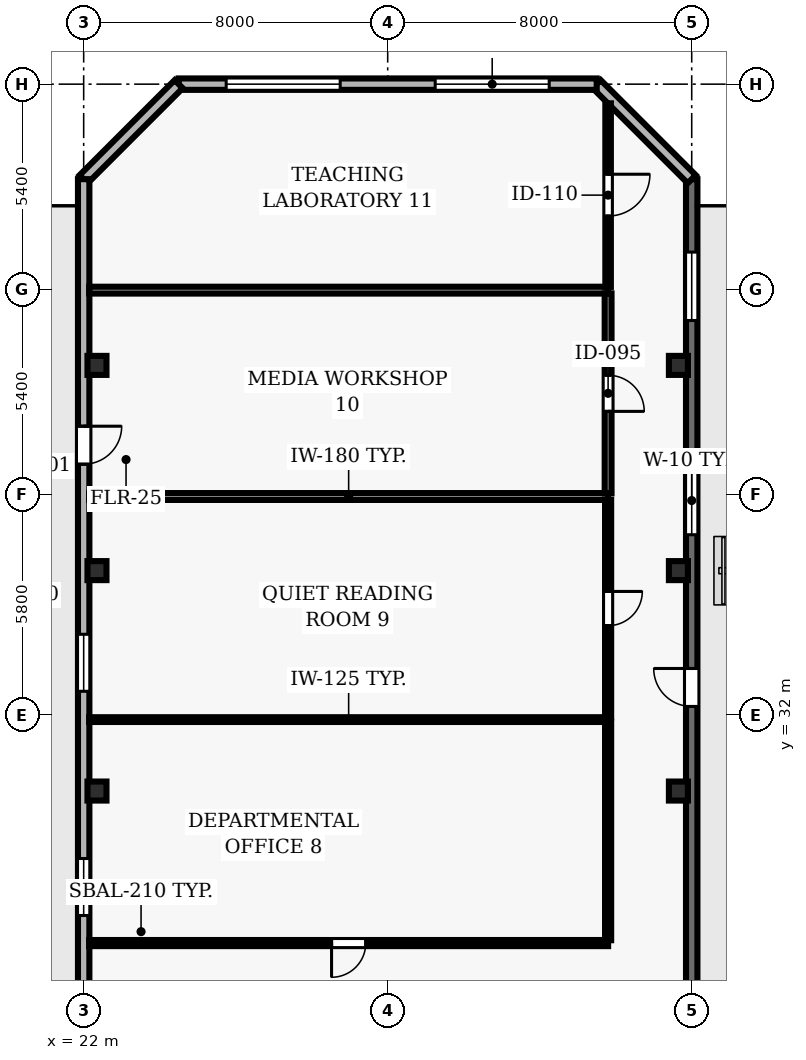
"""IFC4 building model, lengths in metres.
Left out: names, types, materials, properties, quantities, classifications, styles, units other than length and angle.
Written with IfcOpenShell. Run it as: python <this file> out.ifc"""

import sys

from ifc_helpers import new_model, si_unit, direction, frame, frame_2d, origin, origin_2d, place, context, subcontext, project, spatial, rectangle, hollow_rectangle, extrude, element, fill, save


model = new_model("IFC4")
c1 = context("Model", 3, precision=1e-05, world=origin(), true_north=direction((0.0, 1.0)))
c2 = subcontext(c1, "Body", "Model", "MODEL_VIEW")
j1 = project(units=[si_unit("LENGTHUNIT", "METRE"), si_unit("PLANEANGLEUNIT", "RADIAN")], contexts=[c1])
p1 = place(None, origin())
s1 = spatial("IfcSite", under=j1, at=p1, CompositionType="ELEMENT")
p2 = place(p1, origin())
s2 = spatial("IfcBuilding", under=s1, at=p2, CompositionType="ELEMENT")
p3 = place(p2, frame((0.0, 0.0, 154.1)))
s3 = spatial("IfcBuildingStorey", under=s2, at=p3, CompositionType="ELEMENT", Elevation=154.1)
for number, where, z_axis, x_axis in (
    (1, (22.35, 30.0, 0.0), (0.0, 0.0, 1.0), (1.0, 0.0, 0.0)),
    (2, (37.65, 30.0, 0.0), (0.0, 0.0, 1.0), (1.0, 0.0, 0.0)),
    (3, (22.35, 35.8, 0.0), (0.0, 0.0, 1.0), (1.0, 0.0, 0.0)),
    (4, (37.65, 35.8, 0.0), (0.0, 0.0, 1.0), (1.0, 0.0, 0.0)),
    (5, (22.35, 41.2, 0.0), (0.0, 0.0, 1.0), (1.0, 0.0, 0.0)),
    (6, (37.65, 41.2, 0.0), (0.0, 0.0, 1.0), (1.0, 0.0, 0.0)),
):
    element("IfcColumn", number, at=place(p3, frame(where, z_axis=z_axis, x_axis=x_axis)), inside=s3, PredefinedType="COLUMN", context=c2, shape_type="SweptSolid", body=[
        extrude(hollow_rectangle(XDim=0.5, YDim=0.5, WallThickness=0.025, at=origin_2d()), origin(), (0.0, 0.0, 1.0), 3.9),
    ])
p4 = place(p3, frame((38.0, 23.55, 0.0), z_axis=(0.0, 0.0, 1.0), x_axis=(0.0, 1.0, 0.0)))
e7 = element("IfcWall", 7, at=p4, inside=s3, PredefinedType="SOLIDWALL", context=c2, shape_type="SweptSolid", body=[
    extrude(rectangle(XDim=22.55, YDim=0.3, at=frame_2d((11.275, 0.0))), origin(), (0.0, 0.0, 1.0), 3.69),
])
p5 = place(p4, frame((8.675, 0.0, 0.0)))
e8 = element("IfcOpeningElement", 8, at=p5, cuts=e7, PredefinedType="OPENING", context=c2, shape_type="SweptSolid", body=[
    extrude(rectangle(XDim=1.0, YDim=2.2, at=frame_2d((0.5, 1.1))), frame((0.0, 0.16, 0.0), z_axis=(0.0, -1.0, 0.0), x_axis=(1.0, 0.0, 0.0)), (0.0, 0.0, 1.0), 0.32),
])
p6 = place(p4, frame((13.194, 0.0, 0.9)))
e9 = element("IfcOpeningElement", 9, at=p6, cuts=e7, PredefinedType="OPENING", context=c2, shape_type="SweptSolid", body=[
    extrude(rectangle(XDim=1.8, YDim=2.2, at=frame_2d((0.9, 1.1))), frame((0.0, 0.16, 0.0), z_axis=(0.0, -1.0, 0.0), x_axis=(1.0, 0.0, 0.0)), (0.0, 0.0, 1.0), 0.32),
])
p7 = place(p4, frame((18.831, 0.0, 0.9)))
e10 = element("IfcOpeningElement", 10, at=p7, cuts=e7, PredefinedType="OPENING", context=c2, shape_type="SweptSolid", body=[
    extrude(rectangle(XDim=1.8, YDim=2.2, at=frame_2d((0.9, 1.1))), frame((0.0, 0.16, 0.0), z_axis=(0.0, -1.0, 0.0), x_axis=(1.0, 0.0, 0.0)), (0.0, 0.0, 1.0), 0.32),
])
p8 = place(p3, frame((38.0, 46.1, 0.0), z_axis=(0.0, 0.0, 1.0), x_axis=(-0.707106781187, 0.707106781187, 0.0)))
e11 = element("IfcWall", 11, at=p8, inside=s3, PredefinedType="SOLIDWALL", context=c2, shape_type="SweptSolid", body=[
    extrude(rectangle(XDim=3.536, YDim=0.3, at=frame_2d((1.768, 0.0))), origin(), (0.0, 0.0, 1.0), 3.69),
])
p9 = place(p3, frame((35.5, 48.6, 0.0), z_axis=(0.0, 0.0, 1.0), x_axis=(-1.0, 0.0, 0.0)))
e12 = element("IfcWall", 12, at=p9, inside=s3, PredefinedType="SOLIDWALL", context=c2, shape_type="SweptSolid", body=[
    extrude(rectangle(XDim=11.0, YDim=0.3, at=frame_2d((5.5, 0.0))), origin(), (0.0, 0.0, 1.0), 3.69),
])
p10 = place(p9, frame((1.25, 0.0, 0.9)))
e13 = element("IfcOpeningElement", 13, at=p10, cuts=e12, PredefinedType="OPENING", context=c2, shape_type="SweptSolid", body=[
    extrude(rectangle(XDim=3.0, YDim=2.2, at=frame_2d((1.5, 1.1))), frame((0.0, 0.16, 0.0), z_axis=(0.0, -1.0, 0.0), x_axis=(1.0, 0.0, 0.0)), (0.0, 0.0, 1.0), 0.32),
])
p11 = place(p9, frame((6.75, 0.0, 0.9)))
e14 = element("IfcOpeningElement", 14, at=p11, cuts=e12, PredefinedType="OPENING", context=c2, shape_type="SweptSolid", body=[
    extrude(rectangle(XDim=3.0, YDim=2.2, at=frame_2d((1.5, 1.1))), frame((0.0, 0.16, 0.0), z_axis=(0.0, -1.0, 0.0), x_axis=(1.0, 0.0, 0.0)), (0.0, 0.0, 1.0), 0.32),
])
p12 = place(p3, frame((24.5, 48.6, 0.0), z_axis=(0.0, 0.0, 1.0), x_axis=(-0.707106781187, -0.707106781187, 0.0)))
e15 = element("IfcWall", 15, at=p12, inside=s3, PredefinedType="SOLIDWALL", context=c2, shape_type="SweptSolid", body=[
    extrude(rectangle(XDim=3.536, YDim=0.3, at=frame_2d((1.768, 0.0))), origin(), (0.0, 0.0, 1.0), 3.69),
])
p13 = place(p3, frame((22.0, 46.1, 0.0), z_axis=(0.0, 0.0, 1.0), x_axis=(0.0, -1.0, 0.0)))
e16 = element("IfcWall", 16, at=p13, inside=s3, PredefinedType="SOLIDWALL", context=c2, shape_type="SweptSolid", body=[
    extrude(rectangle(XDim=43.6, YDim=0.3, at=frame_2d((21.8, 0.0))), origin(), (0.0, 0.0, 1.0), 3.69),
])
p14 = place(p13, frame((6.5, 0.0, 0.0)))
e17 = element("IfcOpeningElement", 17, at=p14, cuts=e16, PredefinedType="OPENING", context=c2, shape_type="SweptSolid", body=[
    extrude(rectangle(XDim=1.0, YDim=2.2, at=frame_2d((0.5, 1.1))), frame((0.0, 0.16, 0.0), z_axis=(0.0, -1.0, 0.0), x_axis=(1.0, 0.0, 0.0)), (0.0, 0.0, 1.0), 0.32),
])
p15 = place(p13, frame((11.975, 0.0, 0.9)))
e18 = element("IfcOpeningElement", 18, at=p15, cuts=e16, PredefinedType="OPENING", context=c2, shape_type="SweptSolid", body=[
    extrude(rectangle(XDim=1.5, YDim=1.6, at=frame_2d((0.75, 0.8))), frame((0.0, 0.16, 0.0), z_axis=(0.0, -1.0, 0.0), x_axis=(1.0, 0.0, 0.0)), (0.0, 0.0, 1.0), 0.32),
])
p16 = place(p13, frame((17.875, 0.0, 0.9)))
e19 = element("IfcOpeningElement", 19, at=p16, cuts=e16, PredefinedType="OPENING", context=c2, shape_type="SweptSolid", body=[
    extrude(rectangle(XDim=1.5, YDim=1.6, at=frame_2d((0.75, 0.8))), frame((0.0, 0.16, 0.0), z_axis=(0.0, -1.0, 0.0), x_axis=(1.0, 0.0, 0.0)), (0.0, 0.0, 1.0), 0.32),
])
p17 = place(p13, frame((23.775, 0.0, 0.9)))
e20 = element("IfcOpeningElement", 20, at=p17, cuts=e16, PredefinedType="OPENING", context=c2, shape_type="SweptSolid", body=[
    extrude(rectangle(XDim=1.5, YDim=1.6, at=frame_2d((0.75, 0.8))), frame((0.0, 0.16, 0.0), z_axis=(0.0, -1.0, 0.0), x_axis=(1.0, 0.0, 0.0)), (0.0, 0.0, 1.0), 0.32),
])
p18 = place(p13, frame((28.775, 0.0, 0.9)))
e21 = element("IfcOpeningElement", 21, at=p18, cuts=e16, PredefinedType="OPENING", context=c2, shape_type="SweptSolid", body=[
    extrude(rectangle(XDim=1.5, YDim=1.6, at=frame_2d((0.75, 0.8))), frame((0.0, 0.16, 0.0), z_axis=(0.0, -1.0, 0.0), x_axis=(1.0, 0.0, 0.0)), (0.0, 0.0, 1.0), 0.32),
])
p19 = place(p13, frame((34.675, 0.0, 0.9)))
e22 = element("IfcOpeningElement", 22, at=p19, cuts=e16, PredefinedType="OPENING", context=c2, shape_type="SweptSolid", body=[
    extrude(rectangle(XDim=1.5, YDim=1.6, at=frame_2d((0.75, 0.8))), frame((0.0, 0.16, 0.0), z_axis=(0.0, -1.0, 0.0), x_axis=(1.0, 0.0, 0.0)), (0.0, 0.0, 1.0), 0.32),
])
p20 = place(p3, frame((35.8, 26.0, 0.0), z_axis=(0.0, 0.0, 1.0), x_axis=(-1.0, 0.0, 0.0)))
e23 = element("IfcWall", 23, at=p20, inside=s3, PredefinedType="PARTITIONING", context=c2, shape_type="SweptSolid", body=[
    extrude(rectangle(XDim=13.655, YDim=0.16, at=frame_2d((6.828, 0.0))), origin(), (0.0, 0.0, 1.0), 3.69),
])
p21 = place(p20, frame((6.377, 0.0, 0.0)))
e24 = element("IfcOpeningElement", 24, at=p21, cuts=e23, PredefinedType="OPENING", context=c2, shape_type="SweptSolid", body=[
    extrude(rectangle(XDim=0.9, YDim=2.1, at=frame_2d((0.45, 1.05))), frame((0.0, 0.09, 0.0), z_axis=(0.0, -1.0, 0.0), x_axis=(1.0, 0.0, 0.0)), (0.0, 0.0, 1.0), 0.18),
])
p22 = place(p3, frame((35.8, 31.88, 0.0), z_axis=(0.0, 0.0, 1.0), x_axis=(-1.0, 0.0, 0.0)))
e25 = element("IfcWall", 25, at=p22, inside=s3, PredefinedType="PARTITIONING", context=c2, shape_type="SweptSolid", body=[
    extrude(rectangle(XDim=13.655, YDim=0.125, at=frame_2d((6.828, 0.0))), origin(), (0.0, 0.0, 1.0), 3.69),
])
for number, where, z_axis, x_axis in (
    (26, (35.8, 37.75, 0.0), (0.0, 0.0, 1.0), (-1.0, 0.0, 0.0)),
    (27, (35.8, 43.18, 0.0), (0.0, 0.0, 1.0), (-1.0, 0.0, 0.0)),
):
    element("IfcWall", number, at=place(p3, frame(where, z_axis=z_axis, x_axis=x_axis)), inside=s3, PredefinedType="PARTITIONING", context=c2, shape_type="SweptSolid", body=[
        extrude(rectangle(XDim=13.655, YDim=0.18, at=frame_2d((6.828, 0.0))), origin(), (0.0, 0.0, 1.0), 3.69),
    ])
p23 = place(p3, frame((35.8, 31.822, 0.0), z_axis=(0.0, 0.0, 1.0), x_axis=(0.0, -1.0, 0.0)))
e28 = element("IfcWall", 28, at=p23, inside=s3, PredefinedType="PARTITIONING", context=c2, shape_type="SweptSolid", body=[
    extrude(rectangle(XDim=5.747, YDim=0.16, at=frame_2d((2.874, 0.0))), origin(), (0.0, 0.0, 1.0), 3.69),
])
p24 = place(p3, frame((35.8, 37.665, 0.0), z_axis=(0.0, 0.0, 1.0), x_axis=(0.0, -1.0, 0.0)))
e29 = element("IfcWall", 29, at=p24, inside=s3, PredefinedType="PARTITIONING", context=c2, shape_type="SweptSolid", body=[
    extrude(rectangle(XDim=5.727, YDim=0.16, at=frame_2d((2.864, 0.0))), origin(), (0.0, 0.0, 1.0), 3.69),
])
p25 = place(p24, frame((2.413, 0.0, 0.0)))
e30 = element("IfcOpeningElement", 30, at=p25, cuts=e29, PredefinedType="OPENING", context=c2, shape_type="SweptSolid", body=[
    extrude(rectangle(XDim=0.9, YDim=2.1, at=frame_2d((0.45, 1.05))), frame((0.0, 0.09, 0.0), z_axis=(0.0, -1.0, 0.0), x_axis=(1.0, 0.0, 0.0)), (0.0, 0.0, 1.0), 0.18),
])
p26 = place(p3, frame((35.8, 43.095, 0.0), z_axis=(0.0, 0.0, 1.0), x_axis=(0.0, -1.0, 0.0)))
e31 = element("IfcWall", 31, at=p26, inside=s3, PredefinedType="PARTITIONING", context=c2, shape_type="SweptSolid", body=[
    extrude(rectangle(XDim=5.26, YDim=0.18, at=frame_2d((2.63, 0.0))), origin(), (0.0, 0.0, 1.0), 3.69),
])
p27 = place(p26, frame((2.155, 0.0, 0.0)))
e32 = element("IfcOpeningElement", 32, at=p27, cuts=e31, PredefinedType="OPENING", context=c2, shape_type="SweptSolid", body=[
    extrude(rectangle(XDim=0.95, YDim=2.1, at=frame_2d((0.475, 1.05))), frame((0.0, 0.1, 0.0), z_axis=(0.0, -1.0, 0.0), x_axis=(1.0, 0.0, 0.0)), (0.0, 0.0, 1.0), 0.2),
])
p28 = place(p3, frame((35.8, 48.095, 0.0), z_axis=(0.0, 0.0, 1.0), x_axis=(0.0, -1.0, 0.0)))
e33 = element("IfcWall", 33, at=p28, inside=s3, PredefinedType="PARTITIONING", context=c2, shape_type="SweptSolid", body=[
    extrude(rectangle(XDim=4.83, YDim=0.145, at=frame_2d((2.415, 0.0))), origin(), (0.0, 0.0, 1.0), 3.69),
])
p29 = place(p28, frame((1.865, 0.0, 0.0)))
e34 = element("IfcOpeningElement", 34, at=p29, cuts=e33, PredefinedType="OPENING", context=c2, shape_type="SweptSolid", body=[
    extrude(rectangle(XDim=1.1, YDim=2.15, at=frame_2d((0.55, 1.075))), frame((0.0, 0.083, 0.0), z_axis=(0.0, -1.0, 0.0), x_axis=(1.0, 0.0, 0.0)), (0.0, 0.0, 1.0), 0.165),
])
p30 = place(p5, origin())
e35 = element("IfcDoor", 35, at=p30, inside=s3, OperationType="SINGLE_SWING_RIGHT", PredefinedType="DOOR", context=c2, shape_type="SweptSolid", body=[
    extrude(rectangle(XDim=1.0, YDim=2.2, at=frame_2d((0.5, 1.1))), frame((0.0, 0.025, 0.0), z_axis=(0.0, -1.0, 0.0), x_axis=(1.0, 0.0, 0.0)), (0.0, 0.0, 1.0), 0.05),
])
fill(e8, e35)
p31 = place(p6, origin())
e36 = element("IfcWindow", 36, at=p31, inside=s3, PartitioningType="SINGLE_PANEL", PredefinedType="WINDOW", context=c2, shape_type="SweptSolid", body=[
    extrude(rectangle(XDim=1.8, YDim=2.2, at=frame_2d((0.9, 1.1))), frame((0.0, 0.03, 0.0), z_axis=(0.0, -1.0, 0.0), x_axis=(1.0, 0.0, 0.0)), (0.0, 0.0, 1.0), 0.06),
])
fill(e9, e36)
p32 = place(p7, origin())
e37 = element("IfcWindow", 37, at=p32, inside=s3, PartitioningType="SINGLE_PANEL", PredefinedType="WINDOW", context=c2, shape_type="SweptSolid", body=[
    extrude(rectangle(XDim=1.8, YDim=2.2, at=frame_2d((0.9, 1.1))), frame((0.0, 0.03, 0.0), z_axis=(0.0, -1.0, 0.0), x_axis=(1.0, 0.0, 0.0)), (0.0, 0.0, 1.0), 0.06),
])
fill(e10, e37)
p33 = place(p10, origin())
e38 = element("IfcWindow", 38, at=p33, inside=s3, PartitioningType="SINGLE_PANEL", PredefinedType="WINDOW", context=c2, shape_type="SweptSolid", body=[
    extrude(rectangle(XDim=3.0, YDim=2.2, at=frame_2d((1.5, 1.1))), frame((0.0, 0.03, 0.0), z_axis=(0.0, -1.0, 0.0), x_axis=(1.0, 0.0, 0.0)), (0.0, 0.0, 1.0), 0.06),
])
fill(e13, e38)
p34 = place(p11, origin())
e39 = element("IfcWindow", 39, at=p34, inside=s3, PartitioningType="SINGLE_PANEL", PredefinedType="WINDOW", context=c2, shape_type="SweptSolid", body=[
    extrude(rectangle(XDim=3.0, YDim=2.2, at=frame_2d((1.5, 1.1))), frame((0.0, 0.03, 0.0), z_axis=(0.0, -1.0, 0.0), x_axis=(1.0, 0.0, 0.0)), (0.0, 0.0, 1.0), 0.06),
])
fill(e14, e39)
p35 = place(p14, origin())
e40 = element("IfcDoor", 40, at=p35, inside=s3, OperationType="SINGLE_SWING_LEFT", PredefinedType="DOOR", context=c2, shape_type="SweptSolid", body=[
    extrude(rectangle(XDim=1.0, YDim=2.2, at=frame_2d((0.5, 1.1))), frame((0.0, 0.025, 0.0), z_axis=(0.0, -1.0, 0.0), x_axis=(1.0, 0.0, 0.0)), (0.0, 0.0, 1.0), 0.05),
])
fill(e17, e40)
p36 = place(p15, origin())
e41 = element("IfcWindow", 41, at=p36, inside=s3, PartitioningType="SINGLE_PANEL", PredefinedType="WINDOW", context=c2, shape_type="SweptSolid", body=[
    extrude(rectangle(XDim=1.5, YDim=1.6, at=frame_2d((0.75, 0.8))), frame((0.0, 0.03, 0.0), z_axis=(0.0, -1.0, 0.0), x_axis=(1.0, 0.0, 0.0)), (0.0, 0.0, 1.0), 0.06),
])
fill(e18, e41)
p37 = place(p16, origin())
e42 = element("IfcWindow", 42, at=p37, inside=s3, PartitioningType="SINGLE_PANEL", PredefinedType="WINDOW", context=c2, shape_type="SweptSolid", body=[
    extrude(rectangle(XDim=1.5, YDim=1.6, at=frame_2d((0.75, 0.8))), frame((0.0, 0.03, 0.0), z_axis=(0.0, -1.0, 0.0), x_axis=(1.0, 0.0, 0.0)), (0.0, 0.0, 1.0), 0.06),
])
fill(e19, e42)
p38 = place(p21, origin())
e43 = element("IfcDoor", 43, at=p38, inside=s3, OperationType="SINGLE_SWING_RIGHT", PredefinedType="DOOR", context=c2, shape_type="SweptSolid", body=[
    extrude(rectangle(XDim=0.9, YDim=2.1, at=frame_2d((0.45, 1.05))), frame((0.0, 0.025, 0.0), z_axis=(0.0, -1.0, 0.0), x_axis=(1.0, 0.0, 0.0)), (0.0, 0.0, 1.0), 0.05),
])
fill(e24, e43)
p39 = place(p25, origin())
e44 = element("IfcDoor", 44, at=p39, inside=s3, OperationType="SINGLE_SWING_LEFT", PredefinedType="DOOR", context=c2, shape_type="SweptSolid", body=[
    extrude(rectangle(XDim=0.9, YDim=2.1, at=frame_2d((0.45, 1.05))), frame((0.0, 0.025, 0.0), z_axis=(0.0, -1.0, 0.0), x_axis=(1.0, 0.0, 0.0)), (0.0, 0.0, 1.0), 0.05),
])
fill(e30, e44)
p40 = place(p27, origin())
e45 = element("IfcDoor", 45, at=p40, inside=s3, OperationType="SINGLE_SWING_RIGHT", PredefinedType="DOOR", context=c2, shape_type="SweptSolid", body=[
    extrude(rectangle(XDim=0.95, YDim=2.1, at=frame_2d((0.475, 1.05))), frame((0.0, 0.025, 0.0), z_axis=(0.0, -1.0, 0.0), x_axis=(1.0, 0.0, 0.0)), (0.0, 0.0, 1.0), 0.05),
])
fill(e32, e45)
p41 = place(p29, origin())
e46 = element("IfcDoor", 46, at=p41, inside=s3, OperationType="SINGLE_SWING_LEFT", PredefinedType="DOOR", context=c2, shape_type="SweptSolid", body=[
    extrude(rectangle(XDim=1.1, YDim=2.15, at=frame_2d((0.55, 1.075))), frame((0.0, 0.025, 0.0), z_axis=(0.0, -1.0, 0.0), x_axis=(1.0, 0.0, 0.0)), (0.0, 0.0, 1.0), 0.05),
])
fill(e34, e46)
save(model, sys.argv[1])
